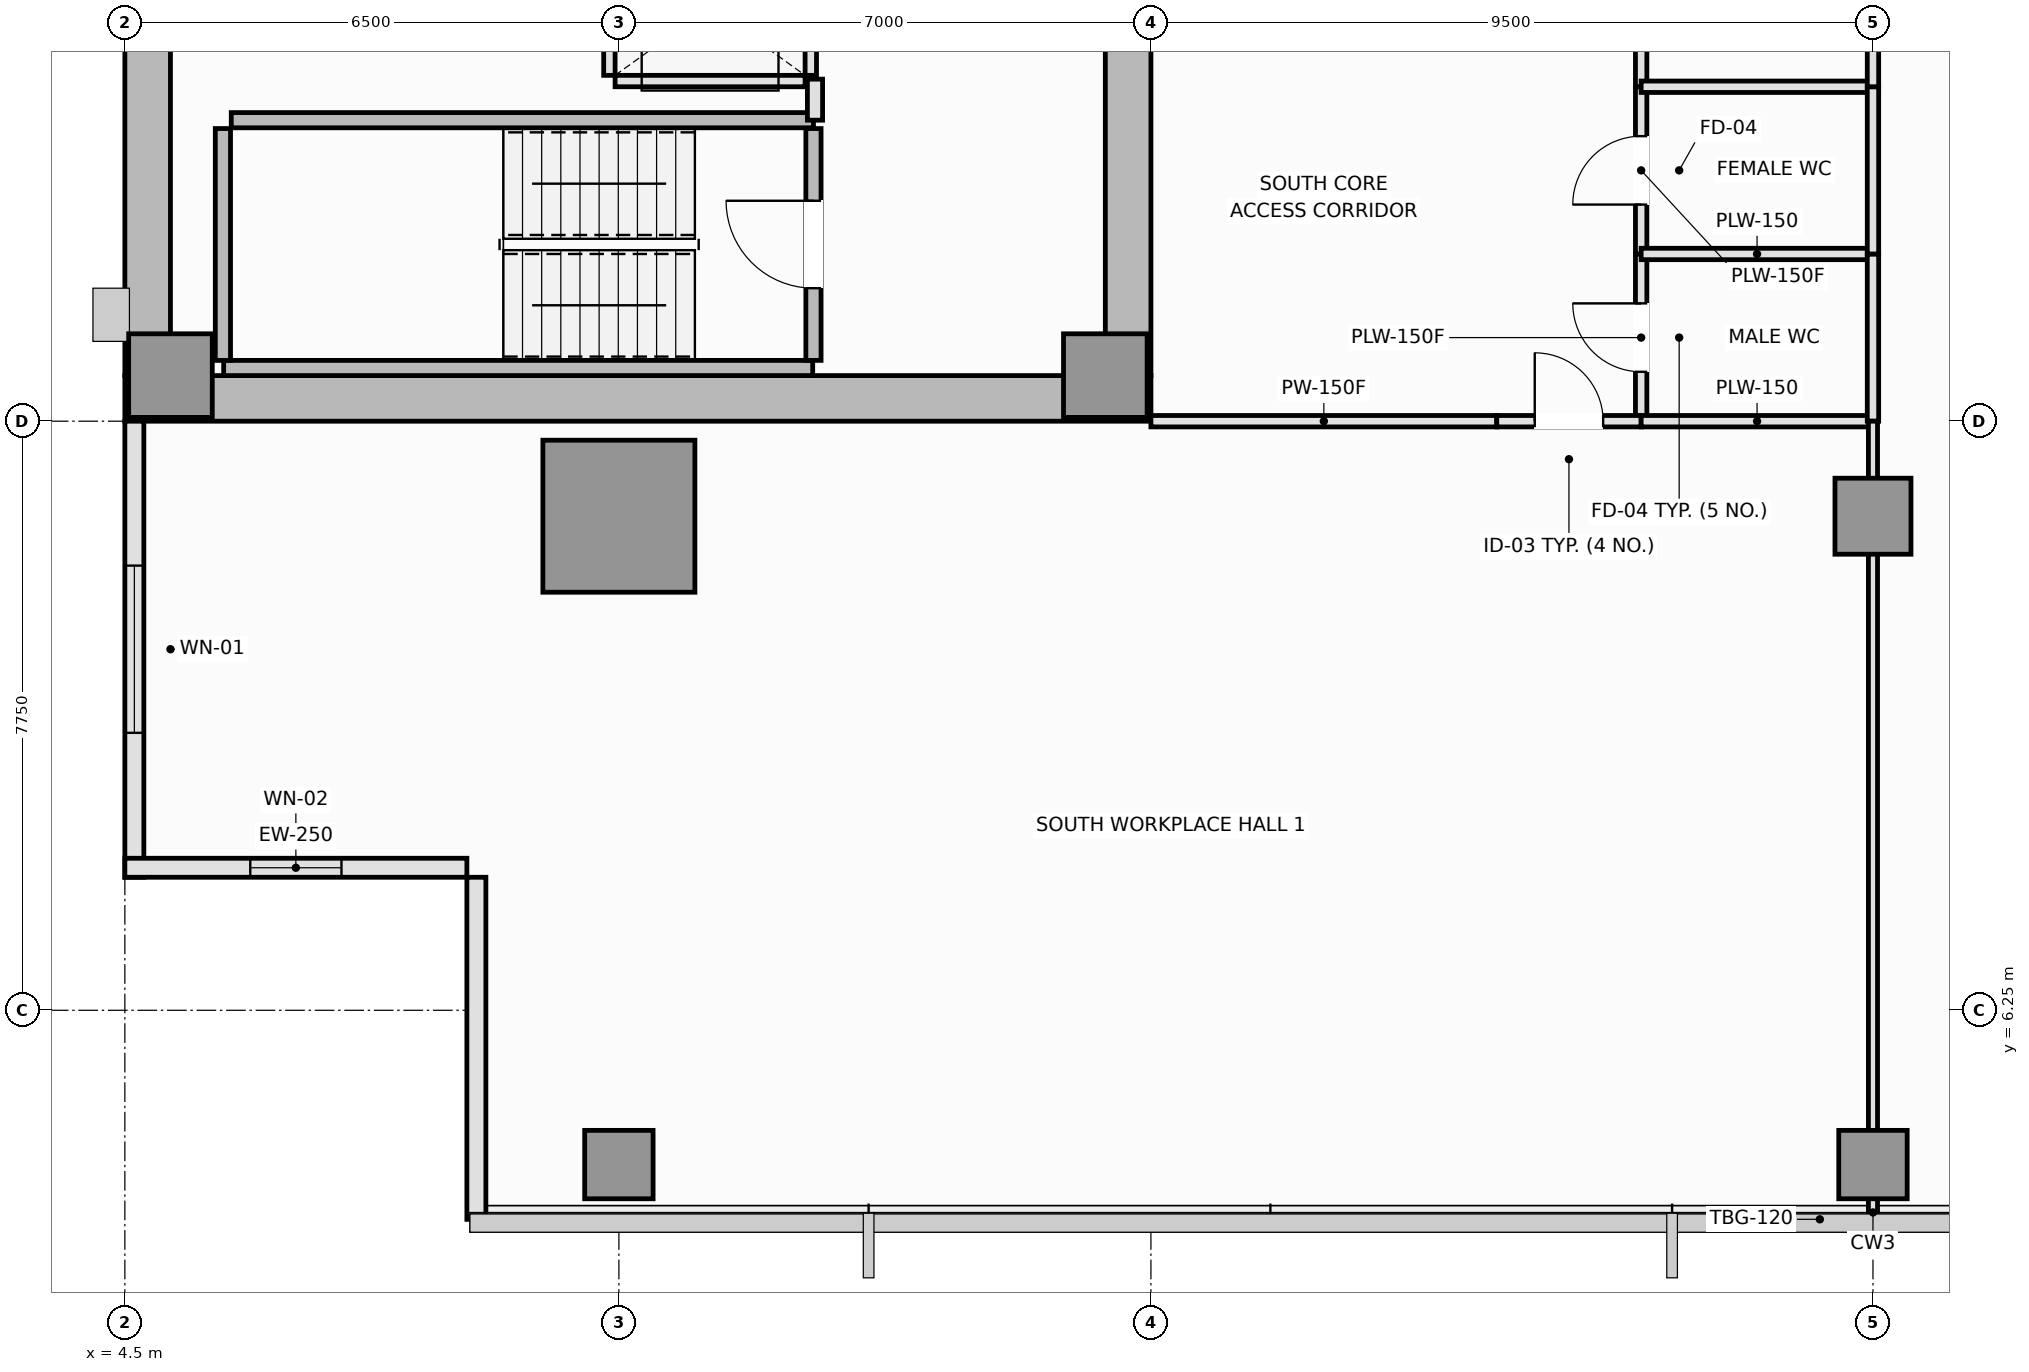
"""IFC4 building model, lengths in metres.
Left out: names, types, materials, properties, quantities, classifications, styles, units other than length and angle.
Written with IfcOpenShell. Run it as: python <this file> out.ifc"""

import sys

from ifc_helpers import new_model, si_unit, direction, frame, frame_2d, origin, origin_2d, place, context, subcontext, project, spatial, rectangle, extrude, element, fill, save


model = new_model("IFC4")
c1 = context("Model", 3, precision=1e-05, world=origin(), true_north=direction((0.0, 1.0)))
c2 = subcontext(c1, "Body", "Model", "MODEL_VIEW")
j1 = project(units=[si_unit("LENGTHUNIT", "METRE"), si_unit("PLANEANGLEUNIT", "RADIAN")], contexts=[c1])
p1 = place(None, origin())
s1 = spatial("IfcSite", under=j1, at=p1, CompositionType="ELEMENT")
p2 = place(p1, origin())
s2 = spatial("IfcBuilding", under=s1, at=p2, CompositionType="ELEMENT")
p3 = place(p2, frame((0.0, 0.0, 102.25)))
s3 = spatial("IfcBuildingStorey", under=s2, at=p3, CompositionType="ELEMENT", Elevation=102.25)
p4 = place(p3, frame((4.5, 14.3, 0.0), z_axis=(0.0, 0.0, 1.0), x_axis=(1.0, 0.0, 0.0)))
e1 = element("IfcWall", 1, at=p4, inside=s3, PredefinedType="SHEAR", context=c2, shape_type="SweptSolid", body=[
    extrude(rectangle(XDim=13.5, YDim=0.6, at=frame_2d((6.75, 0.0))), origin(), (0.0, 0.0, 1.0), 3.55),
])
p5 = place(p3, frame((4.8, 14.6, 0.0), z_axis=(0.0, 0.0, 1.0), x_axis=(0.0, 1.0, 0.0)))
e2 = element("IfcWall", 2, at=p5, inside=s3, PredefinedType="SHEAR", context=c2, shape_type="SweptSolid", body=[
    extrude(rectangle(XDim=21.3, YDim=0.6, at=frame_2d((10.65, 0.0))), origin(), (0.0, 0.0, 1.0), 3.55),
])
p6 = place(p3, frame((17.7, 14.6, 0.0), z_axis=(0.0, 0.0, 1.0), x_axis=(0.0, 1.0, 0.0)))
e3 = element("IfcWall", 3, at=p6, inside=s3, PredefinedType="SHEAR", context=c2, shape_type="SweptSolid", body=[
    extrude(rectangle(XDim=8.85, YDim=0.6, at=frame_2d((4.425, 0.0))), origin(), (0.0, 0.0, 1.0), 3.55),
])
p7 = place(p6, frame((4.3, 0.0, 0.0)))
e4 = element("IfcOpeningElement", 4, at=p7, cuts=e3, PredefinedType="OPENING", context=c2, shape_type="SweptSolid", body=[
    extrude(rectangle(XDim=1.1, YDim=2.15, at=frame_2d((0.55, 1.075))), frame((0.0, 0.31, 0.0), z_axis=(0.0, -1.0, 0.0), x_axis=(1.0, 0.0, 0.0)), (0.0, 0.0, 1.0), 0.62),
])
for number, where, z_axis, x_axis in (
    (5, (5.1, 14.6, 0.0), (0.0, 0.0, 1.0), (1.0, 0.0, 0.0)),
    (6, (17.4, 14.6, 0.0), (0.0, 0.0, 1.0), (1.0, 0.0, 0.0)),
):
    element("IfcColumn", number, at=place(p3, frame(where, z_axis=z_axis, x_axis=x_axis)), inside=s3, PredefinedType="PILASTER", context=c2, shape_type="SweptSolid", body=[
        extrude(rectangle(XDim=1.1, YDim=1.1, at=origin_2d()), origin(), (0.0, 0.0, 1.0), 3.55),
    ])
p8 = place(p3, frame((11.0, 12.75, 0.0), z_axis=(0.0, 0.0, 1.0), x_axis=(1.0, 0.0, 0.0)))
e7 = element("IfcColumn", 7, at=p8, inside=s3, PredefinedType="COLUMN", context=c2, shape_type="SweptSolid", body=[
    extrude(rectangle(XDim=2.0, YDim=2.0, at=origin_2d()), origin(), (0.0, 0.0, 1.0), 3.55),
])
p9 = place(p3, frame((27.5, 12.75, 0.0), z_axis=(0.0, 0.0, 1.0), x_axis=(1.0, 0.0, 0.0)))
e8 = element("IfcColumn", 8, at=p9, inside=s3, PredefinedType="COLUMN", context=c2, shape_type="SweptSolid", body=[
    extrude(rectangle(XDim=1.0, YDim=1.0, at=origin_2d()), origin(), (0.0, 0.0, 1.0), 3.55),
])
for number, where, z_axis, x_axis in (
    (9, (11.0, 4.22, 0.0), (0.0, 0.0, 1.0), (1.0, 0.0, 0.0)),
    (10, (27.5, 4.22, 0.0), (0.0, 0.0, 1.0), (1.0, 0.0, 0.0)),
):
    element("IfcColumn", number, at=place(p3, frame(where, z_axis=z_axis, x_axis=x_axis)), inside=s3, PredefinedType="COLUMN", context=c2, shape_type="SweptSolid", body=[
        extrude(rectangle(XDim=0.9, YDim=0.9, at=origin_2d()), origin(), (0.0, 0.0, 1.0), 3.55),
    ])
p10 = place(p3, frame((4.625, 14.0, 0.0), z_axis=(0.0, 0.0, 1.0), x_axis=(0.0, -1.0, 0.0)))
e11 = element("IfcWall", 11, at=p10, inside=s3, PredefinedType="SOLIDWALL", context=c2, shape_type="SweptSolid", body=[
    extrude(rectangle(XDim=6.0, YDim=0.25, at=frame_2d((3.0, 0.0))), origin(), (0.0, 0.0, 1.0), 3.37),
])
p11 = place(p10, frame((1.9, 0.0, 0.9)))
e12 = element("IfcOpeningElement", 12, at=p11, cuts=e11, PredefinedType="OPENING", context=c2, shape_type="SweptSolid", body=[
    extrude(rectangle(XDim=2.2, YDim=1.8, at=frame_2d((1.1, 0.9))), frame((0.0, 0.135, 0.0), z_axis=(0.0, -1.0, 0.0), x_axis=(1.0, 0.0, 0.0)), (0.0, 0.0, 1.0), 0.27),
])
p12 = place(p3, frame((4.5, 8.125, 0.0), z_axis=(0.0, 0.0, 1.0), x_axis=(1.0, 0.0, 0.0)))
e13 = element("IfcWall", 13, at=p12, inside=s3, PredefinedType="SOLIDWALL", context=c2, shape_type="SweptSolid", body=[
    extrude(rectangle(XDim=4.5, YDim=0.25, at=frame_2d((2.25, 0.0))), origin(), (0.0, 0.0, 1.0), 3.37),
])
p13 = place(p12, frame((1.65, 0.0, 0.9)))
e14 = element("IfcOpeningElement", 14, at=p13, cuts=e13, PredefinedType="OPENING", context=c2, shape_type="SweptSolid", body=[
    extrude(rectangle(XDim=1.2, YDim=1.8, at=frame_2d((0.6, 0.9))), frame((0.0, 0.135, 0.0), z_axis=(0.0, -1.0, 0.0), x_axis=(1.0, 0.0, 0.0)), (0.0, 0.0, 1.0), 0.27),
])
p14 = place(p3, frame((9.125, 8.0, 0.0), z_axis=(0.0, 0.0, 1.0), x_axis=(0.0, -1.0, 0.0)))
e15 = element("IfcWall", 15, at=p14, inside=s3, PredefinedType="SOLIDWALL", context=c2, shape_type="SweptSolid", body=[
    extrude(rectangle(XDim=4.5, YDim=0.25, at=frame_2d((2.25, 0.0))), origin(), (0.0, 0.0, 1.0), 3.37),
])
p15 = place(p3, frame((5.8, 14.7, 0.0), z_axis=(0.0, 0.0, 1.0), x_axis=(1.0, 0.0, 0.0)))
e16 = element("IfcWall", 16, at=p15, inside=s3, PredefinedType="SOLIDWALL", context=c2, shape_type="SweptSolid", body=[
    extrude(rectangle(XDim=7.75, YDim=0.2, at=frame_2d((3.875, 0.0))), origin(), (0.0, 0.0, 1.0), 3.55),
])
p16 = place(p3, frame((5.79, 14.8, 0.0), z_axis=(0.0, 0.0, 1.0), x_axis=(0.0, 1.0, 0.0)))
e17 = element("IfcWall", 17, at=p16, inside=s3, PredefinedType="SOLIDWALL", context=c2, shape_type="SweptSolid", body=[
    extrude(rectangle(XDim=3.05, YDim=0.2, at=frame_2d((1.525, 0.0))), origin(), (0.0, 0.0, 1.0), 3.55),
])
p17 = place(p3, frame((5.9, 17.96, 0.0), z_axis=(0.0, 0.0, 1.0), x_axis=(1.0, 0.0, 0.0)))
e18 = element("IfcWall", 18, at=p17, inside=s3, PredefinedType="SOLIDWALL", context=c2, shape_type="SweptSolid", body=[
    extrude(rectangle(XDim=7.66, YDim=0.2, at=frame_2d((3.83, 0.0))), origin(), (0.0, 0.0, 1.0), 3.55),
])
p18 = place(p3, frame((13.56, 14.8, 0.0), z_axis=(0.0, 0.0, 1.0), x_axis=(0.0, 1.0, 0.0)))
e19 = element("IfcWall", 19, at=p18, inside=s3, PredefinedType="SOLIDWALL", context=c2, shape_type="SweptSolid", body=[
    extrude(rectangle(XDim=3.05, YDim=0.2, at=frame_2d((1.525, 0.0))), origin(), (0.0, 0.0, 1.0), 3.55),
])
p19 = place(p18, frame((0.95, 0.0, 0.0)))
e20 = element("IfcOpeningElement", 20, at=p19, cuts=e19, PredefinedType="OPENING", context=c2, shape_type="SweptSolid", body=[
    extrude(rectangle(XDim=1.15, YDim=2.15, at=frame_2d((0.575, 1.075))), frame((0.0, 0.11, 0.0), z_axis=(0.0, -1.0, 0.0), x_axis=(1.0, 0.0, 0.0)), (0.0, 0.0, 1.0), 0.22),
])
p20 = place(p3, frame((10.95, 18.475, 0.0), z_axis=(0.0, 0.0, 1.0), x_axis=(1.0, 0.0, 0.0)))
e21 = element("IfcWall", 21, at=p20, inside=s3, PredefinedType="PARTITIONING", context=c2, shape_type="SweptSolid", body=[
    extrude(rectangle(XDim=2.5, YDim=0.15, at=frame_2d((1.25, 0.0))), origin(), (0.0, 0.0, 1.0), 3.37),
])
p21 = place(p3, frame((10.875, 18.55, 0.0), z_axis=(0.0, 0.0, 1.0), x_axis=(0.0, 1.0, 0.0)))
e22 = element("IfcWall", 22, at=p21, inside=s3, PredefinedType="PARTITIONING", context=c2, shape_type="SweptSolid", body=[
    extrude(rectangle(XDim=1.8, YDim=0.15, at=frame_2d((0.9, 0.0))), origin(), (0.0, 0.0, 1.0), 3.37),
])
p22 = place(p3, frame((13.525, 18.55, 0.0), z_axis=(0.0, 0.0, 1.0), x_axis=(0.0, 1.0, 0.0)))
e23 = element("IfcWall", 23, at=p22, inside=s3, PredefinedType="PARTITIONING", context=c2, shape_type="SweptSolid", body=[
    extrude(rectangle(XDim=1.8, YDim=0.15, at=frame_2d((0.9, 0.0))), origin(), (0.0, 0.0, 1.0), 3.37),
])
p23 = place(p22, frame((0.35, 0.0, 0.0)))
e24 = element("IfcOpeningElement", 24, at=p23, cuts=e23, PredefinedType="OPENING", context=c2, shape_type="SweptSolid", body=[
    extrude(rectangle(XDim=1.1, YDim=2.2, at=frame_2d((0.55, 1.1))), frame((0.0, 0.085, 0.0), z_axis=(0.0, -1.0, 0.0), x_axis=(1.0, 0.0, 0.0)), (0.0, 0.0, 1.0), 0.17),
])
p24 = place(p3, frame((13.58, 17.96, 0.0), z_axis=(0.0, 0.0, 1.0), x_axis=(0.0, 1.0, 0.0)))
e25 = element("IfcWall", 25, at=p24, inside=s3, PredefinedType="PARTITIONING", context=c2, shape_type="SweptSolid", body=[
    extrude(rectangle(XDim=0.54, YDim=0.2, at=frame_2d((0.27, 0.0))), origin(), (0.0, 0.0, 1.0), 3.37),
])
p25 = place(p3, frame((18.0, 14.0, 0.0), z_axis=(0.0, 0.0, 1.0), x_axis=(1.0, 0.0, 0.0)))
e26 = element("IfcWall", 26, at=p25, inside=s3, PredefinedType="PARTITIONING", context=c2, shape_type="SweptSolid", body=[
    extrude(rectangle(XDim=4.55, YDim=0.15, at=frame_2d((2.275, 0.0))), origin(), (0.0, 0.0, 1.0), 3.37),
])
p26 = place(p3, frame((24.45, 14.0, 0.0), z_axis=(0.0, 0.0, 1.0), x_axis=(0.0, 1.0, 0.0)))
e27 = element("IfcWall", 27, at=p26, inside=s3, PredefinedType="PLUMBINGWALL", context=c2, shape_type="SweptSolid", body=[
    extrude(rectangle(XDim=2.2, YDim=0.15, at=frame_2d((1.1, 0.0))), origin(), (0.0, 0.0, 1.0), 3.37),
])
p27 = place(p26, frame((0.65, 0.0, 0.0)))
e28 = element("IfcOpeningElement", 28, at=p27, cuts=e27, PredefinedType="OPENING", context=c2, shape_type="SweptSolid", body=[
    extrude(rectangle(XDim=0.9, YDim=2.1, at=frame_2d((0.45, 1.05))), frame((0.0, 0.085, 0.0), z_axis=(0.0, -1.0, 0.0), x_axis=(1.0, 0.0, 0.0)), (0.0, 0.0, 1.0), 0.17),
])
p28 = place(p3, frame((24.45, 16.2, 0.0), z_axis=(0.0, 0.0, 1.0), x_axis=(0.0, 1.0, 0.0)))
e29 = element("IfcWall", 29, at=p28, inside=s3, PredefinedType="PLUMBINGWALL", context=c2, shape_type="SweptSolid", body=[
    extrude(rectangle(XDim=2.2, YDim=0.15, at=frame_2d((1.1, 0.0))), origin(), (0.0, 0.0, 1.0), 3.37),
])
p29 = place(p28, frame((0.65, 0.0, 0.0)))
e30 = element("IfcOpeningElement", 30, at=p29, cuts=e29, PredefinedType="OPENING", context=c2, shape_type="SweptSolid", body=[
    extrude(rectangle(XDim=0.9, YDim=2.1, at=frame_2d((0.45, 1.05))), frame((0.0, 0.085, 0.0), z_axis=(0.0, -1.0, 0.0), x_axis=(1.0, 0.0, 0.0)), (0.0, 0.0, 1.0), 0.17),
])
p30 = place(p3, frame((24.45, 18.4, 0.0), z_axis=(0.0, 0.0, 1.0), x_axis=(0.0, 1.0, 0.0)))
e31 = element("IfcWall", 31, at=p30, inside=s3, PredefinedType="PLUMBINGWALL", context=c2, shape_type="SweptSolid", body=[
    extrude(rectangle(XDim=2.0, YDim=0.15, at=frame_2d((1.0, 0.0))), origin(), (0.0, 0.0, 1.0), 3.37),
])
p31 = place(p30, frame((0.55, 0.0, 0.0)))
e32 = element("IfcOpeningElement", 32, at=p31, cuts=e31, PredefinedType="OPENING", context=c2, shape_type="SweptSolid", body=[
    extrude(rectangle(XDim=0.9, YDim=2.1, at=frame_2d((0.45, 1.05))), frame((0.0, 0.085, 0.0), z_axis=(0.0, -1.0, 0.0), x_axis=(1.0, 0.0, 0.0)), (0.0, 0.0, 1.0), 0.17),
])
p32 = place(p3, frame((22.55, 14.0, 0.0), z_axis=(0.0, 0.0, 1.0), x_axis=(1.0, 0.0, 0.0)))
e33 = element("IfcWall", 33, at=p32, inside=s3, PredefinedType="PARTITIONING", context=c2, shape_type="SweptSolid", body=[
    extrude(rectangle(XDim=1.9, YDim=0.15, at=frame_2d((0.95, 0.0))), origin(), (0.0, 0.0, 1.0), 3.37),
])
p33 = place(p32, frame((0.5, 0.0, 0.0)))
e34 = element("IfcOpeningElement", 34, at=p33, cuts=e33, PredefinedType="OPENING", context=c2, shape_type="SweptSolid", body=[
    extrude(rectangle(XDim=0.9, YDim=2.1, at=frame_2d((0.45, 1.05))), frame((0.0, 0.085, 0.0), z_axis=(0.0, -1.0, 0.0), x_axis=(1.0, 0.0, 0.0)), (0.0, 0.0, 1.0), 0.17),
])
for number, where, z_axis, x_axis in (
    (35, (24.45, 16.2, 0.0), (0.0, 0.0, 1.0), (1.0, 0.0, 0.0)),
    (36, (24.45, 14.0, 0.0), (0.0, 0.0, 1.0), (1.0, 0.0, 0.0)),
):
    element("IfcWall", number, at=place(p3, frame(where, z_axis=z_axis, x_axis=x_axis)), inside=s3, PredefinedType="PLUMBINGWALL", context=c2, shape_type="SweptSolid", body=[
        extrude(rectangle(XDim=3.05, YDim=0.15, at=frame_2d((1.525, 0.0))), origin(), (0.0, 0.0, 1.0), 3.37),
    ])
p34 = place(p3, frame((27.5, 14.0, 0.0), z_axis=(0.0, 0.0, 1.0), x_axis=(0.0, 1.0, 0.0)))
e37 = element("IfcWall", 37, at=p34, inside=s3, PredefinedType="PLUMBINGWALL", context=c2, shape_type="SweptSolid", body=[
    extrude(rectangle(XDim=2.2, YDim=0.15, at=frame_2d((1.1, 0.0))), origin(), (0.0, 0.0, 1.0), 3.37),
])
p35 = place(p3, frame((24.45, 18.4, 0.0), z_axis=(0.0, 0.0, 1.0), x_axis=(1.0, 0.0, 0.0)))
e38 = element("IfcWall", 38, at=p35, inside=s3, PredefinedType="PLUMBINGWALL", context=c2, shape_type="SweptSolid", body=[
    extrude(rectangle(XDim=3.05, YDim=0.15, at=frame_2d((1.525, 0.0))), origin(), (0.0, 0.0, 1.0), 2.77),
])
p36 = place(p3, frame((27.5, 16.2, 0.0), z_axis=(0.0, 0.0, 1.0), x_axis=(0.0, 1.0, 0.0)))
e39 = element("IfcWall", 39, at=p36, inside=s3, PredefinedType="PLUMBINGWALL", context=c2, shape_type="SweptSolid", body=[
    extrude(rectangle(XDim=2.2, YDim=0.15, at=frame_2d((1.1, 0.0))), origin(), (0.0, 0.0, 1.0), 3.37),
])
p37 = place(p3, frame((27.5, 18.4, 0.0), z_axis=(0.0, 0.0, 1.0), x_axis=(0.0, 1.0, 0.0)))
e40 = element("IfcWall", 40, at=p37, inside=s3, PredefinedType="PLUMBINGWALL", context=c2, shape_type="SweptSolid", body=[
    extrude(rectangle(XDim=2.0, YDim=0.15, at=frame_2d((1.0, 0.0))), origin(), (0.0, 0.0, 1.0), 3.37),
])
p38 = place(p3, frame((27.5, 3.51, 0.0), z_axis=(0.0, 0.0, 1.0), x_axis=(0.0, 1.0, 0.0)))
e41 = element("IfcWall", 41, at=p38, inside=s3, PredefinedType="PARTITIONING", context=c2, shape_type="SweptSolid", body=[
    extrude(rectangle(XDim=10.49, YDim=0.12, at=frame_2d((5.245, 0.0))), origin(), (0.0, 0.0, 1.0), 2.87),
])
p39 = place(p11, origin())
e42 = element("IfcWindow", 42, at=p39, inside=s3, PartitioningType="SINGLE_PANEL", PredefinedType="WINDOW", context=c2, shape_type="SweptSolid", body=[
    extrude(rectangle(XDim=2.2, YDim=1.8, at=frame_2d((1.1, 0.9))), frame((0.0, 0.03, 0.0), z_axis=(0.0, -1.0, 0.0), x_axis=(1.0, 0.0, 0.0)), (0.0, 0.0, 1.0), 0.06),
])
fill(e12, e42)
p40 = place(p13, origin())
e43 = element("IfcWindow", 43, at=p40, inside=s3, PartitioningType="SINGLE_PANEL", PredefinedType="WINDOW", context=c2, shape_type="SweptSolid", body=[
    extrude(rectangle(XDim=1.2, YDim=1.8, at=frame_2d((0.6, 0.9))), frame((0.0, 0.03, 0.0), z_axis=(0.0, -1.0, 0.0), x_axis=(1.0, 0.0, 0.0)), (0.0, 0.0, 1.0), 0.06),
])
fill(e14, e43)
p41 = place(p19, origin())
e44 = element("IfcDoor", 44, at=p41, inside=s3, OperationType="SINGLE_SWING_RIGHT", PredefinedType="DOOR", context=c2, shape_type="SweptSolid", body=[
    extrude(rectangle(XDim=1.15, YDim=2.15, at=frame_2d((0.575, 1.075))), frame((0.0, 0.025, 0.0), z_axis=(0.0, -1.0, 0.0), x_axis=(1.0, 0.0, 0.0)), (0.0, 0.0, 1.0), 0.05),
])
fill(e20, e44)
p42 = place(p27, origin())
e45 = element("IfcDoor", 45, at=p42, inside=s3, OperationType="SINGLE_SWING_RIGHT", PredefinedType="DOOR", context=c2, shape_type="SweptSolid", body=[
    extrude(rectangle(XDim=0.9, YDim=2.1, at=frame_2d((0.45, 1.05))), frame((0.0, 0.025, 0.0), z_axis=(0.0, -1.0, 0.0), x_axis=(1.0, 0.0, 0.0)), (0.0, 0.0, 1.0), 0.05),
])
fill(e28, e45)
p43 = place(p29, origin())
e46 = element("IfcDoor", 46, at=p43, inside=s3, OperationType="SINGLE_SWING_LEFT", PredefinedType="DOOR", context=c2, shape_type="SweptSolid", body=[
    extrude(rectangle(XDim=0.9, YDim=2.1, at=frame_2d((0.45, 1.05))), frame((0.0, 0.025, 0.0), z_axis=(0.0, -1.0, 0.0), x_axis=(1.0, 0.0, 0.0)), (0.0, 0.0, 1.0), 0.05),
])
fill(e30, e46)
p44 = place(p33, origin())
e47 = element("IfcDoor", 47, at=p44, inside=s3, OperationType="SINGLE_SWING_LEFT", PredefinedType="DOOR", context=c2, shape_type="SweptSolid", body=[
    extrude(rectangle(XDim=0.9, YDim=2.1, at=frame_2d((0.45, 1.05))), frame((0.0, 0.025, 0.0), z_axis=(0.0, -1.0, 0.0), x_axis=(1.0, 0.0, 0.0)), (0.0, 0.0, 1.0), 0.05),
])
fill(e34, e47)
save(model, sys.argv[1])
